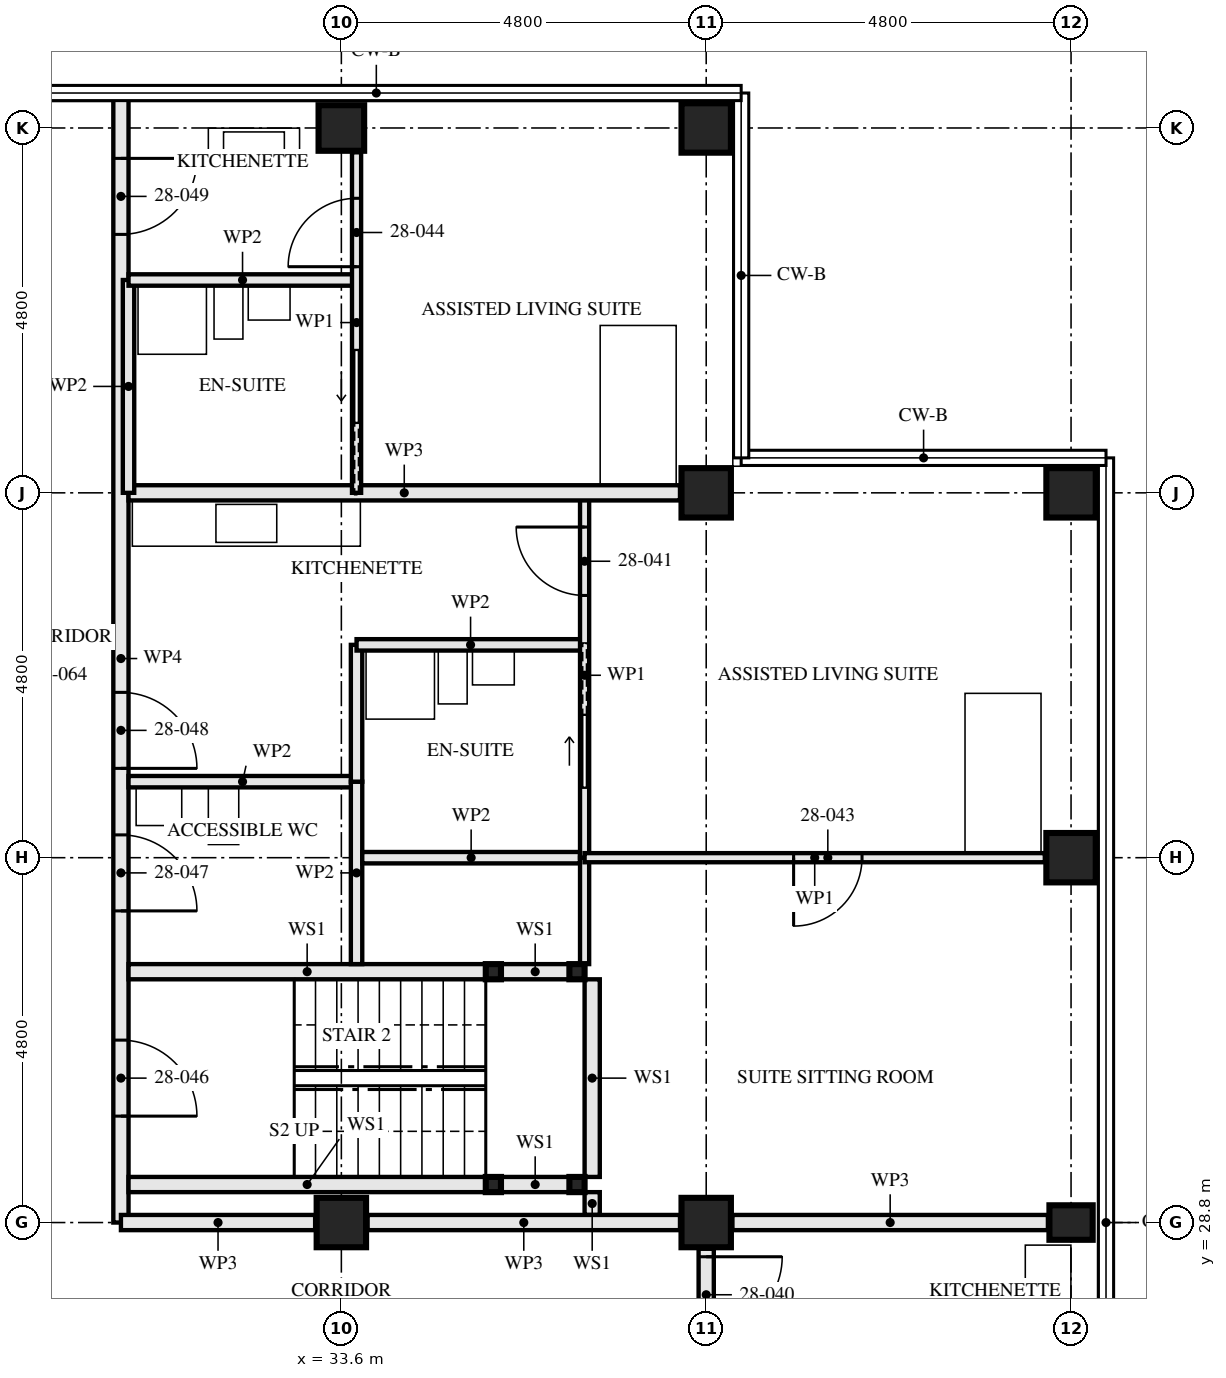
"""IFC4 building model, lengths in metres.
Left out: names, types, materials, properties, quantities, classifications, styles, units other than length and angle.
Written with IfcOpenShell. Run it as: python <this file> out.ifc"""

import sys

from ifc_helpers import new_model, si_unit, direction, frame, frame_2d, origin, origin_2d, place, context, subcontext, project, spatial, rectangle, hollow_rectangle, i_section, extrude, element, fill, save


model = new_model("IFC4")
c1 = context("Model", 3, precision=1e-05, world=origin(), true_north=direction((0.0, 1.0)))
c2 = subcontext(c1, "Body", "Model", "MODEL_VIEW")
j1 = project(units=[si_unit("LENGTHUNIT", "METRE"), si_unit("PLANEANGLEUNIT", "RADIAN")], contexts=[c1])
p1 = place(None, origin())
s1 = spatial("IfcSite", under=j1, at=p1, CompositionType="ELEMENT")
p2 = place(p1, origin())
s2 = spatial("IfcBuilding", under=s1, at=p2, CompositionType="ELEMENT")
p3 = place(p2, frame((0.0, 0.0, 105.0)))
s3 = spatial("IfcBuildingStorey", under=s2, at=p3, CompositionType="ELEMENT", Elevation=105.0)
p4 = place(p3, frame((33.6, 28.8, 0.0), z_axis=(0.0, 0.0, 1.0), x_axis=(0.0, 1.0, 0.0)))
e1 = element("IfcColumn", 1, at=p4, inside=s3, PredefinedType="COLUMN", context=c2, shape_type="SweptSolid", body=[
    extrude(hollow_rectangle(XDim=0.65, YDim=0.65, WallThickness=0.05, at=origin_2d()), origin(), (0.0, 0.0, 1.0), 3.5),
])
p5 = place(p3, frame((33.6, 43.2, 0.0), z_axis=(0.0, 0.0, 1.0), x_axis=(0.0, 1.0, 0.0)))
e2 = element("IfcColumn", 2, at=p5, inside=s3, PredefinedType="COLUMN", context=c2, shape_type="SweptSolid", body=[
    extrude(hollow_rectangle(XDim=0.6, YDim=0.6, WallThickness=0.08, at=origin_2d()), origin(), (0.0, 0.0, 1.0), 3.5),
])
p6 = place(p3, frame((38.4, 28.8, 0.0), z_axis=(0.0, 0.0, 1.0), x_axis=(0.0, 1.0, 0.0)))
e3 = element("IfcColumn", 3, at=p6, inside=s3, PredefinedType="COLUMN", context=c2, shape_type="SweptSolid", body=[
    extrude(hollow_rectangle(XDim=0.65, YDim=0.65, WallThickness=0.05, at=origin_2d()), origin(), (0.0, 0.0, 1.0), 3.5),
])
for number, where, z_axis, x_axis in (
    (4, (38.4, 38.4, 0.0), (0.0, 0.0, 1.0), (0.0, 1.0, 0.0)),
    (5, (38.4, 43.2, 0.0), (0.0, 0.0, 1.0), (0.0, 1.0, 0.0)),
):
    element("IfcColumn", number, at=place(p3, frame(where, z_axis=z_axis, x_axis=x_axis)), inside=s3, PredefinedType="COLUMN", context=c2, shape_type="SweptSolid", body=[
        extrude(hollow_rectangle(XDim=0.65, YDim=0.65, WallThickness=0.08, at=origin_2d()), origin(), (0.0, 0.0, 1.0), 3.5),
    ])
p7 = place(p3, frame((43.2, 28.8, 0.0), z_axis=(0.0, 0.0, 1.0), x_axis=(0.0, 1.0, 0.0)))
e6 = element("IfcColumn", 6, at=p7, inside=s3, PredefinedType="COLUMN", context=c2, shape_type="SweptSolid", body=[
    extrude(i_section(OverallWidth=0.454, OverallDepth=0.569, WebThickness=0.078, FlangeThickness=0.125, FilletRadius=0.015, at=origin_2d()), origin(), (0.0, 0.0, 1.0), 3.5),
])
for number, where, z_axis, x_axis in (
    (7, (43.2, 33.6, 0.0), (0.0, 0.0, 1.0), (1.0, 0.0, 0.0)),
    (8, (43.2, 38.4, 0.0), (0.0, 0.0, 1.0), (0.0, 1.0, 0.0)),
):
    element("IfcColumn", number, at=place(p3, frame(where, z_axis=z_axis, x_axis=x_axis)), inside=s3, PredefinedType="COLUMN", context=c2, shape_type="SweptSolid", body=[
        extrude(hollow_rectangle(XDim=0.65, YDim=0.65, WallThickness=0.08, at=origin_2d()), origin(), (0.0, 0.0, 1.0), 3.5),
    ])
for number, where, z_axis, x_axis in (
    (9, (36.7, 29.3, 0.0), (0.0, 0.0, 1.0), (1.0, 0.0, 0.0)),
    (10, (36.7, 32.1, 0.0), (0.0, 0.0, 1.0), (1.0, 0.0, 0.0)),
    (11, (35.6, 29.3, 0.0), (0.0, 0.0, 1.0), (1.0, 0.0, 0.0)),
    (12, (35.6, 32.1, 0.0), (0.0, 0.0, 1.0), (1.0, 0.0, 0.0)),
):
    element("IfcColumn", number, at=place(p3, frame(where, z_axis=z_axis, x_axis=x_axis)), inside=s3, PredefinedType="COLUMN", context=c2, shape_type="SweptSolid", body=[
        extrude(hollow_rectangle(XDim=0.2, YDim=0.2, WallThickness=0.008, at=origin_2d()), origin(), (0.0, 0.0, 1.0), 3.33),
    ])
p8 = place(p3, frame((38.4, 26.8, 0.0), z_axis=(0.0, 0.0, 1.0), x_axis=(0.0, 1.0, 0.0)))
e13 = element("IfcWall", 13, at=p8, inside=s3, PredefinedType="PARTITIONING", context=c2, shape_type="SweptSolid", body=[
    extrude(rectangle(XDim=1.655, YDim=0.2, at=frame_2d((0.828, 0.0))), origin(), (0.0, 0.0, 1.0), 3.33),
])
p9 = place(p8, frame((0.55, 0.0, 0.0)))
e14 = element("IfcOpeningElement", 14, at=p9, cuts=e13, PredefinedType="OPENING", context=c2, shape_type="SweptSolid", body=[
    extrude(rectangle(XDim=1.0, YDim=2.1, at=frame_2d((0.5, 1.05))), frame((0.0, 0.111, 0.0), z_axis=(0.0, -1.0, 0.0), x_axis=(1.0, 0.0, 0.0)), (0.0, 0.0, 1.0), 0.221),
])
p10 = place(p3, frame((36.6, 29.3, 0.0), z_axis=(0.0, 0.0, 1.0), x_axis=(-1.0, 0.0, 0.0)))
e15 = element("IfcWall", 15, at=p10, inside=s3, PredefinedType="SOLIDWALL", context=c2, shape_type="SweptSolid", body=[
    extrude(rectangle(XDim=0.9, YDim=0.2, at=frame_2d((0.45, 0.0))), origin(), (0.0, 0.0, 1.0), 2.99),
])
p11 = place(p3, frame((35.5, 29.3, 0.0), z_axis=(0.0, 0.0, 1.0), x_axis=(-1.0, 0.0, 0.0)))
e16 = element("IfcWall", 16, at=p11, inside=s3, PredefinedType="SOLIDWALL", context=c2, shape_type="SweptSolid", body=[
    extrude(rectangle(XDim=4.7, YDim=0.2, at=frame_2d((2.35, 0.0))), origin(), (0.0, 0.0, 1.0), 2.99),
])
p12 = place(p3, frame((36.6, 32.1, 0.0), z_axis=(0.0, 0.0, 1.0), x_axis=(-1.0, 0.0, 0.0)))
e17 = element("IfcWall", 17, at=p12, inside=s3, PredefinedType="SOLIDWALL", context=c2, shape_type="SweptSolid", body=[
    extrude(rectangle(XDim=0.9, YDim=0.2, at=frame_2d((0.45, 0.0))), origin(), (0.0, 0.0, 1.0), 2.99),
])
p13 = place(p3, frame((35.5, 32.1, 0.0), z_axis=(0.0, 0.0, 1.0), x_axis=(-1.0, 0.0, 0.0)))
e18 = element("IfcWall", 18, at=p13, inside=s3, PredefinedType="SOLIDWALL", context=c2, shape_type="SweptSolid", body=[
    extrude(rectangle(XDim=4.7, YDim=0.2, at=frame_2d((2.35, 0.0))), origin(), (0.0, 0.0, 1.0), 2.99),
])
p14 = place(p3, frame((36.9, 28.9, 0.0), z_axis=(0.0, 0.0, 1.0), x_axis=(0.0, 1.0, 0.0)))
e19 = element("IfcWall", 19, at=p14, inside=s3, PredefinedType="SOLIDWALL", context=c2, shape_type="SweptSolid", body=[
    extrude(rectangle(XDim=0.3, YDim=0.2, at=frame_2d((0.15, 0.0))), origin(), (0.0, 0.0, 1.0), 3.33),
])
p15 = place(p3, frame((36.9, 29.4, 0.0), z_axis=(0.0, 0.0, 1.0), x_axis=(0.0, 1.0, 0.0)))
e20 = element("IfcWall", 20, at=p15, inside=s3, PredefinedType="SOLIDWALL", context=c2, shape_type="SweptSolid", body=[
    extrude(rectangle(XDim=2.6, YDim=0.2, at=frame_2d((1.3, 0.0))), origin(), (0.0, 0.0, 1.0), 3.33),
])
p16 = place(p3, frame((33.8, 32.2, 0.0), z_axis=(0.0, 0.0, 1.0), x_axis=(0.0, 1.0, 0.0)))
e21 = element("IfcWall", 21, at=p16, inside=s3, PredefinedType="PARTITIONING", context=c2, shape_type="SweptSolid", body=[
    extrude(rectangle(XDim=2.4, YDim=0.15, at=frame_2d((1.2, 0.0))), origin(), (0.0, 0.0, 1.0), 2.55),
])
for number, where, z_axis, x_axis in (
    (22, (33.8, 34.6, 0.0), (0.0, 0.0, 1.0), (-1.0, 0.0, 0.0)),
    (23, (36.8, 36.4, 0.0), (0.0, 0.0, 1.0), (-1.0, 0.0, 0.0)),
):
    element("IfcWall", number, at=place(p3, frame(where, z_axis=z_axis, x_axis=x_axis)), inside=s3, PredefinedType="PARTITIONING", context=c2, shape_type="SweptSolid", body=[
        extrude(rectangle(XDim=3.0, YDim=0.15, at=frame_2d((1.5, 0.0))), origin(), (0.0, 0.0, 1.0), 3.33),
    ])
p17 = place(p3, frame((33.8, 34.6, 0.0), z_axis=(0.0, 0.0, 1.0), x_axis=(0.0, 1.0, 0.0)))
e24 = element("IfcWall", 24, at=p17, inside=s3, PredefinedType="PARTITIONING", context=c2, shape_type="SweptSolid", body=[
    extrude(rectangle(XDim=1.8, YDim=0.15, at=frame_2d((0.9, 0.0))), origin(), (0.0, 0.0, 1.0), 3.33),
])
p18 = place(p3, frame((36.8, 32.2, 0.0), z_axis=(0.0, 0.0, 1.0), x_axis=(0.0, 1.0, 0.0)))
e25 = element("IfcWall", 25, at=p18, inside=s3, PredefinedType="PARTITIONING", context=c2, shape_type="SweptSolid", body=[
    extrude(rectangle(XDim=1.4, YDim=0.12, at=frame_2d((0.7, 0.0))), origin(), (0.0, 0.0, 1.0), 3.33),
])
p19 = place(p3, frame((36.8, 33.6, 0.0), z_axis=(0.0, 0.0, 1.0), x_axis=(0.0, 1.0, 0.0)))
e26 = element("IfcWall", 26, at=p19, inside=s3, PredefinedType="PARTITIONING", context=c2, shape_type="SweptSolid", body=[
    extrude(rectangle(XDim=4.8, YDim=0.12, at=frame_2d((2.4, 0.0))), origin(), (0.0, 0.0, 1.0), 3.33),
])
p20 = place(p19, frame((3.45, 0.0, 0.0)))
e27 = element("IfcOpeningElement", 27, at=p20, cuts=e26, PredefinedType="OPENING", context=c2, shape_type="SweptSolid", body=[
    extrude(rectangle(XDim=0.9, YDim=2.1, at=frame_2d((0.45, 1.05))), frame((0.0, 0.071, 0.0), z_axis=(0.0, -1.0, 0.0), x_axis=(1.0, 0.0, 0.0)), (0.0, 0.0, 1.0), 0.141),
])
p21 = place(p19, frame((0.925, 0.0, 0.0)))
e28 = element("IfcOpeningElement", 28, at=p21, cuts=e26, PredefinedType="OPENING", context=c2, shape_type="SweptSolid", body=[
    extrude(rectangle(XDim=0.95, YDim=2.1, at=frame_2d((0.475, 1.05))), frame((0.0, 0.071, 0.0), z_axis=(0.0, -1.0, 0.0), x_axis=(1.0, 0.0, 0.0)), (0.0, 0.0, 1.0), 0.141),
])
p22 = place(p3, frame((42.855, 33.6, 0.0), z_axis=(0.0, 0.0, 1.0), x_axis=(-1.0, 0.0, 0.0)))
e29 = element("IfcWall", 29, at=p22, inside=s3, PredefinedType="PARTITIONING", context=c2, shape_type="SweptSolid", body=[
    extrude(rectangle(XDim=6.055, YDim=0.12, at=frame_2d((3.027, 0.0))), origin(), (0.0, 0.0, 1.0), 2.55),
])
p23 = place(p22, frame((2.405, 0.0, 0.0)))
e30 = element("IfcOpeningElement", 30, at=p23, cuts=e29, PredefinedType="OPENING", context=c2, shape_type="SweptSolid", body=[
    extrude(rectangle(XDim=0.9, YDim=2.1, at=frame_2d((0.45, 1.05))), frame((0.0, 0.071, 0.0), z_axis=(0.0, -1.0, 0.0), x_axis=(1.0, 0.0, 0.0)), (0.0, 0.0, 1.0), 0.141),
])
p24 = place(p3, frame((38.055, 38.4, 0.0), z_axis=(0.0, 0.0, 1.0), x_axis=(-1.0, 0.0, 0.0)))
e31 = element("IfcWall", 31, at=p24, inside=s3, PredefinedType="PARTITIONING", context=c2, shape_type="SweptSolid", body=[
    extrude(rectangle(XDim=7.255, YDim=0.2, at=frame_2d((3.627, 0.0))), origin(), (0.0, 0.0, 1.0), 2.55),
])
p25 = place(p3, frame((33.8, 41.2, 0.0), z_axis=(0.0, 0.0, 1.0), x_axis=(-1.0, 0.0, 0.0)))
e32 = element("IfcWall", 32, at=p25, inside=s3, PredefinedType="PARTITIONING", context=c2, shape_type="SweptSolid", body=[
    extrude(rectangle(XDim=3.0, YDim=0.15, at=frame_2d((1.5, 0.0))), origin(), (0.0, 0.0, 1.0), 3.33),
])
p26 = place(p3, frame((30.8, 38.4, 0.0), z_axis=(0.0, 0.0, 1.0), x_axis=(0.0, 1.0, 0.0)))
e33 = element("IfcWall", 33, at=p26, inside=s3, PredefinedType="PARTITIONING", context=c2, shape_type="SweptSolid", body=[
    extrude(rectangle(XDim=2.8, YDim=0.15, at=frame_2d((1.4, 0.0))), origin(), (0.0, 0.0, 1.0), 3.33),
])
p27 = place(p3, frame((33.8, 38.4, 0.0), z_axis=(0.0, 0.0, 1.0), x_axis=(0.0, 1.0, 0.0)))
e34 = element("IfcWall", 34, at=p27, inside=s3, PredefinedType="PARTITIONING", context=c2, shape_type="SweptSolid", body=[
    extrude(rectangle(XDim=4.48, YDim=0.12, at=frame_2d((2.24, 0.0))), origin(), (0.0, 0.0, 1.0), 3.33),
])
p28 = place(p27, frame((2.975, 0.0, 0.0)))
e35 = element("IfcOpeningElement", 35, at=p28, cuts=e34, PredefinedType="OPENING", context=c2, shape_type="SweptSolid", body=[
    extrude(rectangle(XDim=0.9, YDim=2.1, at=frame_2d((0.45, 1.05))), frame((0.0, 0.071, 0.0), z_axis=(0.0, -1.0, 0.0), x_axis=(1.0, 0.0, 0.0)), (0.0, 0.0, 1.0), 0.141),
])
p29 = place(p27, frame((0.925, 0.0, 0.0)))
e36 = element("IfcOpeningElement", 36, at=p29, cuts=e34, PredefinedType="OPENING", context=c2, shape_type="SweptSolid", body=[
    extrude(rectangle(XDim=0.95, YDim=2.1, at=frame_2d((0.475, 1.05))), frame((0.0, 0.071, 0.0), z_axis=(0.0, -1.0, 0.0), x_axis=(1.0, 0.0, 0.0)), (0.0, 0.0, 1.0), 0.141),
])
p30 = place(p3, frame((30.7, 28.8, 0.0), z_axis=(0.0, 0.0, 1.0), x_axis=(0.0, 1.0, 0.0)))
e37 = element("IfcWall", 37, at=p30, inside=s3, PredefinedType="PARTITIONING", context=c2, shape_type="SweptSolid", body=[
    extrude(rectangle(XDim=14.84, YDim=0.2, at=frame_2d((7.42, 0.0))), origin(), (0.0, 0.0, 1.0), 2.32),
])
p31 = place(p30, frame((1.4, 0.0, 0.0)))
e38 = element("IfcOpeningElement", 38, at=p31, cuts=e37, PredefinedType="OPENING", context=c2, shape_type="SweptSolid", body=[
    extrude(rectangle(XDim=1.0, YDim=2.1, at=frame_2d((0.5, 1.05))), frame((0.0, 0.111, 0.0), z_axis=(0.0, -1.0, 0.0), x_axis=(1.0, 0.0, 0.0)), (0.0, 0.0, 1.0), 0.221),
])
p32 = place(p30, frame((4.1, 0.0, 0.0)))
e39 = element("IfcOpeningElement", 39, at=p32, cuts=e37, PredefinedType="OPENING", context=c2, shape_type="SweptSolid", body=[
    extrude(rectangle(XDim=1.0, YDim=2.1, at=frame_2d((0.5, 1.05))), frame((0.0, 0.111, 0.0), z_axis=(0.0, -1.0, 0.0), x_axis=(1.0, 0.0, 0.0)), (0.0, 0.0, 1.0), 0.221),
])
p33 = place(p30, frame((5.975, 0.0, 0.0)))
e40 = element("IfcOpeningElement", 40, at=p33, cuts=e37, PredefinedType="OPENING", context=c2, shape_type="SweptSolid", body=[
    extrude(rectangle(XDim=1.0, YDim=2.1, at=frame_2d((0.5, 1.05))), frame((0.0, 0.111, 0.0), z_axis=(0.0, -1.0, 0.0), x_axis=(1.0, 0.0, 0.0)), (0.0, 0.0, 1.0), 0.221),
])
p34 = place(p30, frame((13.0, 0.0, 0.0)))
e41 = element("IfcOpeningElement", 41, at=p34, cuts=e37, PredefinedType="OPENING", context=c2, shape_type="SweptSolid", body=[
    extrude(rectangle(XDim=1.0, YDim=2.1, at=frame_2d((0.5, 1.05))), frame((0.0, 0.111, 0.0), z_axis=(0.0, -1.0, 0.0), x_axis=(1.0, 0.0, 0.0)), (0.0, 0.0, 1.0), 0.221),
])
p35 = place(p3, frame((42.896, 28.8, 0.0), z_axis=(0.0, 0.0, 1.0), x_axis=(-1.0, 0.0, 0.0)))
e42 = element("IfcWall", 42, at=p35, inside=s3, PredefinedType="PARTITIONING", context=c2, shape_type="SweptSolid", body=[
    extrude(rectangle(XDim=4.15, YDim=0.2, at=frame_2d((2.075, 0.0))), origin(), (0.0, 0.0, 1.0), 2.32),
])
p36 = place(p3, frame((38.055, 28.8, 0.0), z_axis=(0.0, 0.0, 1.0), x_axis=(-1.0, 0.0, 0.0)))
e43 = element("IfcWall", 43, at=p36, inside=s3, PredefinedType="PARTITIONING", context=c2, shape_type="SweptSolid", body=[
    extrude(rectangle(XDim=4.11, YDim=0.2, at=frame_2d((2.055, 0.0))), origin(), (0.0, 0.0, 1.0), 2.32),
])
p37 = place(p3, frame((33.255, 28.8, 0.0), z_axis=(0.0, 0.0, 1.0), x_axis=(-1.0, 0.0, 0.0)))
e44 = element("IfcWall", 44, at=p37, inside=s3, PredefinedType="PARTITIONING", context=c2, shape_type="SweptSolid", body=[
    extrude(rectangle(XDim=2.555, YDim=0.2, at=frame_2d((1.277, 0.0))), origin(), (0.0, 0.0, 1.0), 2.32),
])
p38 = place(p3, frame((36.74, 33.6, 0.0), z_axis=(0.0, 0.0, 1.0), x_axis=(-1.0, 0.0, 0.0)))
e45 = element("IfcWall", 45, at=p38, inside=s3, PredefinedType="PARTITIONING", context=c2, shape_type="SweptSolid", body=[
    extrude(rectangle(XDim=2.865, YDim=0.15, at=frame_2d((1.433, 0.0))), origin(), (0.0, 0.0, 1.0), 2.55),
])
p39 = place(p9, frame((1.0, 0.0, 0.0), z_axis=(0.0, 0.0, 1.0), x_axis=(-1.0, 0.0, 0.0)))
e46 = element("IfcDoor", 46, at=p39, inside=s3, OperationType="SINGLE_SWING_RIGHT", PredefinedType="DOOR", context=c2, shape_type="SweptSolid", body=[
    extrude(rectangle(XDim=1.0, YDim=2.1, at=frame_2d((0.5, 1.05))), frame((0.0, 0.027, 0.0), z_axis=(0.0, -1.0, 0.0), x_axis=(1.0, 0.0, 0.0)), (0.0, 0.0, 1.0), 0.054),
])
fill(e14, e46)
p40 = place(p20, origin())
e47 = element("IfcDoor", 47, at=p40, inside=s3, OperationType="SINGLE_SWING_LEFT", PredefinedType="DOOR", context=c2, shape_type="SweptSolid", body=[
    extrude(rectangle(XDim=0.9, YDim=2.1, at=frame_2d((0.45, 1.05))), frame((0.0, 0.022, 0.0), z_axis=(0.0, -1.0, 0.0), x_axis=(1.0, 0.0, 0.0)), (0.0, 0.0, 1.0), 0.044),
])
fill(e27, e47)
p41 = place(p21, origin())
e48 = element("IfcDoor", 48, at=p41, inside=s3, OperationType="SLIDING_TO_LEFT", PredefinedType="DOOR", context=c2, shape_type="SweptSolid", body=[
    extrude(rectangle(XDim=0.95, YDim=2.1, at=frame_2d((0.475, 1.05))), frame((0.0, 0.022, 0.0), z_axis=(0.0, -1.0, 0.0), x_axis=(1.0, 0.0, 0.0)), (0.0, 0.0, 1.0), 0.044),
])
fill(e28, e48)
p42 = place(p23, origin())
e49 = element("IfcDoor", 49, at=p42, inside=s3, OperationType="SINGLE_SWING_LEFT", PredefinedType="DOOR", context=c2, shape_type="SweptSolid", body=[
    extrude(rectangle(XDim=0.9, YDim=2.1, at=frame_2d((0.45, 1.05))), frame((0.0, 0.022, 0.0), z_axis=(0.0, -1.0, 0.0), x_axis=(1.0, 0.0, 0.0)), (0.0, 0.0, 1.0), 0.044),
])
fill(e30, e49)
p43 = place(p28, origin())
e50 = element("IfcDoor", 50, at=p43, inside=s3, OperationType="SINGLE_SWING_RIGHT", PredefinedType="DOOR", context=c2, shape_type="SweptSolid", body=[
    extrude(rectangle(XDim=0.9, YDim=2.1, at=frame_2d((0.45, 1.05))), frame((0.0, 0.022, 0.0), z_axis=(0.0, -1.0, 0.0), x_axis=(1.0, 0.0, 0.0)), (0.0, 0.0, 1.0), 0.044),
])
fill(e35, e50)
p44 = place(p29, origin())
e51 = element("IfcDoor", 51, at=p44, inside=s3, OperationType="SLIDING_TO_RIGHT", PredefinedType="DOOR", context=c2, shape_type="SweptSolid", body=[
    extrude(rectangle(XDim=0.95, YDim=2.1, at=frame_2d((0.475, 1.05))), frame((0.0, 0.022, 0.0), z_axis=(0.0, -1.0, 0.0), x_axis=(1.0, 0.0, 0.0)), (0.0, 0.0, 1.0), 0.044),
])
fill(e36, e51)
p45 = place(p31, frame((1.0, 0.0, 0.0), z_axis=(0.0, 0.0, 1.0), x_axis=(-1.0, 0.0, 0.0)))
e52 = element("IfcDoor", 52, at=p45, inside=s3, OperationType="SINGLE_SWING_LEFT", PredefinedType="DOOR", context=c2, shape_type="SweptSolid", body=[
    extrude(rectangle(XDim=1.0, YDim=2.1, at=frame_2d((0.5, 1.05))), frame((0.0, 0.032, 0.0), z_axis=(0.0, -1.0, 0.0), x_axis=(1.0, 0.0, 0.0)), (0.0, 0.0, 1.0), 0.064),
])
fill(e38, e52)
p46 = place(p32, frame((1.0, 0.0, 0.0), z_axis=(0.0, 0.0, 1.0), x_axis=(-1.0, 0.0, 0.0)))
e53 = element("IfcDoor", 53, at=p46, inside=s3, OperationType="SINGLE_SWING_LEFT", PredefinedType="DOOR", context=c2, shape_type="SweptSolid", body=[
    extrude(rectangle(XDim=1.0, YDim=2.1, at=frame_2d((0.5, 1.05))), frame((0.0, 0.027, 0.0), z_axis=(0.0, -1.0, 0.0), x_axis=(1.0, 0.0, 0.0)), (0.0, 0.0, 1.0), 0.054),
])
fill(e39, e53)
p47 = place(p33, frame((1.0, 0.0, 0.0), z_axis=(0.0, 0.0, 1.0), x_axis=(-1.0, 0.0, 0.0)))
e54 = element("IfcDoor", 54, at=p47, inside=s3, OperationType="SINGLE_SWING_LEFT", PredefinedType="DOOR", context=c2, shape_type="SweptSolid", body=[
    extrude(rectangle(XDim=1.0, YDim=2.1, at=frame_2d((0.5, 1.05))), frame((0.0, 0.027, 0.0), z_axis=(0.0, -1.0, 0.0), x_axis=(1.0, 0.0, 0.0)), (0.0, 0.0, 1.0), 0.054),
])
fill(e40, e54)
p48 = place(p34, frame((1.0, 0.0, 0.0), z_axis=(0.0, 0.0, 1.0), x_axis=(-1.0, 0.0, 0.0)))
e55 = element("IfcDoor", 55, at=p48, inside=s3, OperationType="SINGLE_SWING_RIGHT", PredefinedType="DOOR", context=c2, shape_type="SweptSolid", body=[
    extrude(rectangle(XDim=1.0, YDim=2.1, at=frame_2d((0.5, 1.05))), frame((0.0, 0.027, 0.0), z_axis=(0.0, -1.0, 0.0), x_axis=(1.0, 0.0, 0.0)), (0.0, 0.0, 1.0), 0.054),
])
fill(e41, e55)
save(model, sys.argv[1])
